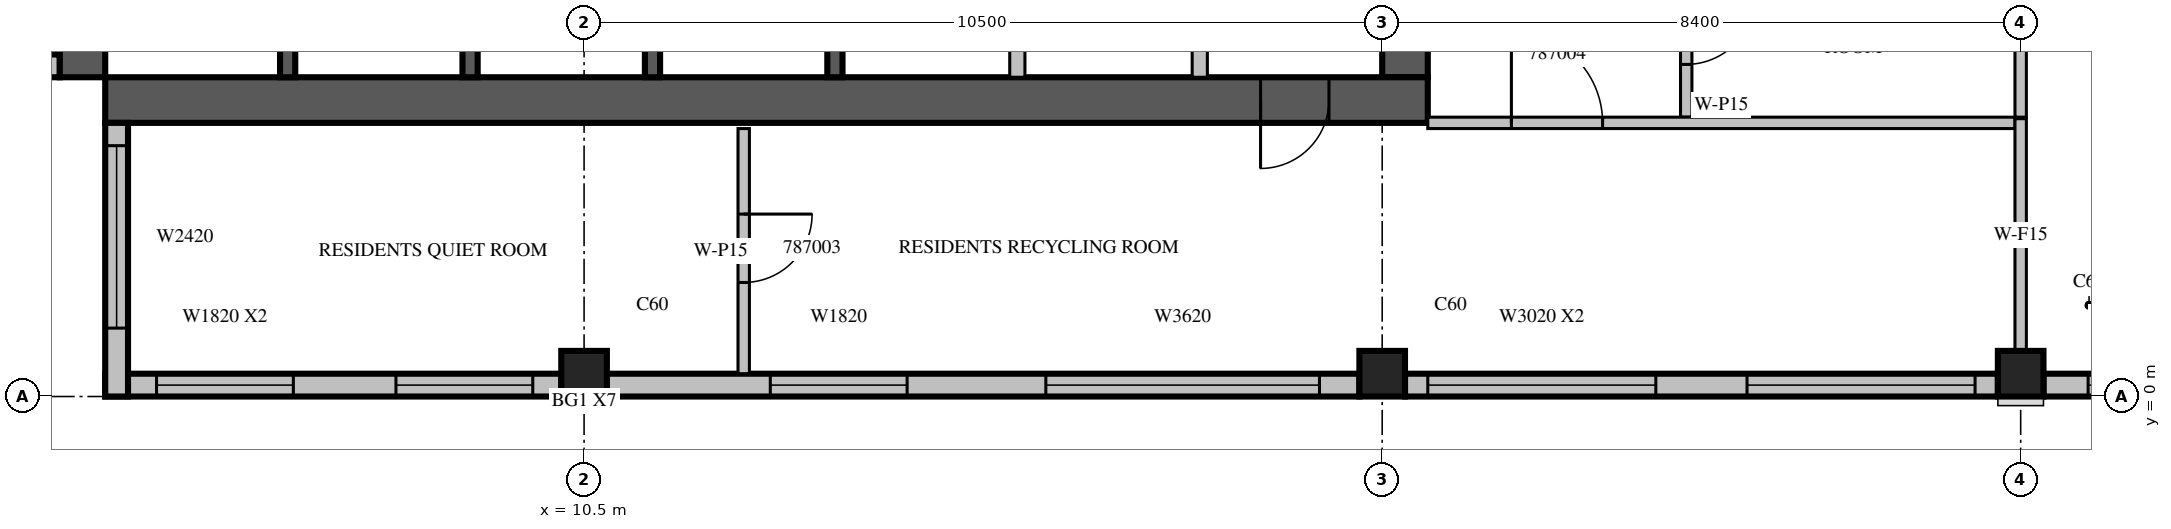
"""IFC4 building model, lengths in metres.
Left out: names, types, materials, properties, quantities, classifications, styles, units other than length and angle.
Written with IfcOpenShell. Run it as: python <this file> out.ifc"""

import sys

from ifc_helpers import new_model, si_unit, direction, frame, frame_2d, origin, origin_2d, place, context, subcontext, project, spatial, rectangle, extrude, source, transform, mapped, element, fill, save


model = new_model("IFC4")
c1 = context("Model", 3, precision=1e-05, world=origin(), true_north=direction((0.0, 1.0)))
c2 = subcontext(c1, "Body", "Model", "MODEL_VIEW")
j1 = project(units=[si_unit("LENGTHUNIT", "METRE"), si_unit("PLANEANGLEUNIT", "RADIAN")], contexts=[c1])
p1 = place(None, origin())
s1 = spatial("IfcSite", under=j1, at=p1, CompositionType="ELEMENT")
p2 = place(p1, origin())
s2 = spatial("IfcBuilding", under=s1, at=p2, CompositionType="ELEMENT")
p3 = place(p2, frame((0.0, 0.0, 365.0)))
s3 = spatial("IfcBuildingStorey", under=s2, at=p3, CompositionType="ELEMENT", Elevation=365.0)
m1 = source(origin(), c2, "Body", "SweptSolid", [
    extrude(rectangle(XDim=0.6, YDim=0.6, at=origin_2d()), origin(), (0.0, 0.0, 1.0), 3.5),
])
for number, where, z_axis, x_axis in (
    (1, (10.5, 0.3, 0.0), (0.0, 0.0, 1.0), (1.0, 0.0, 0.0)),
    (2, (21.0, 0.3, 0.0), (0.0, 0.0, 1.0), (1.0, 0.0, 0.0)),
    (3, (29.4, 0.3, 0.0), (0.0, 0.0, 1.0), (1.0, 0.0, 0.0)),
):
    element("IfcColumn", number, at=place(p3, frame(where, z_axis=z_axis, x_axis=x_axis)), inside=s3, PredefinedType="COLUMN", context=c2, shape_type="MappedRepresentation", body=[
        mapped(m1, transform((0.0, 0.0, 0.0), scale=1.0)),
    ])
m2 = source(origin(), c2, "Body", "SweptSolid", [
    extrude(rectangle(XDim=17.4, YDim=0.6, at=frame_2d((8.7, 0.0))), origin(), (0.0, 0.0, 1.0), 3.5),
])
p4 = place(p3, frame((3.9, 4.2, 0.0), z_axis=(0.0, 0.0, 1.0), x_axis=(0.0, 1.0, 0.0)))
e4 = element("IfcWall", 4, at=p4, inside=s3, PredefinedType="SHEAR", context=c2, shape_type="MappedRepresentation", body=[
    mapped(m2, transform((0.0, 0.0, 0.0), scale=1.0)),
])
m3 = source(origin(), c2, "Body", "SweptSolid", [
    extrude(rectangle(XDim=2.2, YDim=2.1, at=frame_2d((1.1, 1.05))), frame((0.0, 0.31, 0.0), z_axis=(0.0, -1.0, 0.0), x_axis=(1.0, 0.0, 0.0)), (0.0, 0.0, 1.0), 0.62),
])
p5 = place(p4, frame((4.2, 0.0, 0.0)))
e5 = element("IfcOpeningElement", 5, at=p5, cuts=e4, PredefinedType="OPENING", context=c2, shape_type="MappedRepresentation", body=[
    mapped(m3, transform((0.0, 0.0, 0.0), scale=1.0)),
])
m4 = source(origin(), c2, "Body", "SweptSolid", [
    extrude(rectangle(XDim=6.3, YDim=0.6, at=frame_2d((3.15, 0.0))), origin(), (0.0, 0.0, 1.0), 3.5),
])
p6 = place(p3, frame((21.3, 4.2, 0.0), z_axis=(0.0, 0.0, 1.0), x_axis=(0.0, 1.0, 0.0)))
e6 = element("IfcWall", 6, at=p6, inside=s3, PredefinedType="SHEAR", context=c2, shape_type="MappedRepresentation", body=[
    mapped(m4, transform((0.0, 0.0, 0.0), scale=1.0)),
])
p7 = place(p6, frame((4.0, 0.0, 0.0)))
e7 = element("IfcOpeningElement", 7, at=p7, cuts=e6, PredefinedType="OPENING", context=c2, shape_type="MappedRepresentation", body=[
    mapped(m3, transform((0.0, 0.0, 0.0), scale=1.0)),
])
p8 = place(p3, frame((4.2, 3.9, 0.0), z_axis=(0.0, 0.0, 1.0), x_axis=(1.0, 0.0, 0.0)))
e8 = element("IfcWall", 8, at=p8, inside=s3, PredefinedType="SHEAR", context=c2, shape_type="MappedRepresentation", body=[
    mapped(m2, transform((0.0, 0.0, 0.0), scale=1.0)),
])
m5 = source(origin(), c2, "Body", "SweptSolid", [
    extrude(rectangle(XDim=0.9, YDim=2.1, at=frame_2d((0.45, 1.05))), frame((0.0, 0.31, 0.0), z_axis=(0.0, -1.0, 0.0), x_axis=(1.0, 0.0, 0.0)), (0.0, 0.0, 1.0), 0.62),
])
p9 = place(p8, frame((15.2, 0.0, 0.0)))
e9 = element("IfcOpeningElement", 9, at=p9, cuts=e8, PredefinedType="OPENING", context=c2, shape_type="MappedRepresentation", body=[
    mapped(m5, transform((0.0, 0.0, 0.0), scale=1.0)),
])
p10 = place(p3, frame((4.2, 0.15, 0.0), z_axis=(0.0, 0.0, 1.0), x_axis=(1.0, 0.0, 0.0)))
e10 = element("IfcWall", 10, at=p10, inside=s3, PredefinedType="STANDARD", context=c2, shape_type="SweptSolid", body=[
    extrude(rectangle(XDim=6.0, YDim=0.3, at=frame_2d((3.0, 0.0))), origin(), (0.0, 0.0, 1.0), 3.05),
])
m6 = source(origin(), c2, "Body", "SweptSolid", [
    extrude(rectangle(XDim=1.8, YDim=2.0, at=frame_2d((0.9, 1.0))), frame((0.0, 0.16, 0.0), z_axis=(0.0, -1.0, 0.0), x_axis=(1.0, 0.0, 0.0)), (0.0, 0.0, 1.0), 0.32),
])
p11 = place(p10, frame((0.675, 0.0, 0.6)))
e11 = element("IfcOpeningElement", 11, at=p11, cuts=e10, PredefinedType="OPENING", context=c2, shape_type="MappedRepresentation", body=[
    mapped(m6, transform((0.0, 0.0, 0.0), scale=1.0)),
])
p12 = place(p10, frame((3.825, 0.0, 0.6)))
e12 = element("IfcOpeningElement", 12, at=p12, cuts=e10, PredefinedType="OPENING", context=c2, shape_type="MappedRepresentation", body=[
    mapped(m6, transform((0.0, 0.0, 0.0), scale=1.0)),
])
p13 = place(p3, frame((10.8, 0.15, 0.0), z_axis=(0.0, 0.0, 1.0), x_axis=(1.0, 0.0, 0.0)))
e13 = element("IfcWall", 13, at=p13, inside=s3, PredefinedType="STANDARD", context=c2, shape_type="SweptSolid", body=[
    extrude(rectangle(XDim=9.9, YDim=0.3, at=frame_2d((4.95, 0.0))), origin(), (0.0, 0.0, 1.0), 3.05),
])
p14 = place(p13, frame((2.15, 0.0, 0.6)))
e14 = element("IfcOpeningElement", 14, at=p14, cuts=e13, PredefinedType="OPENING", context=c2, shape_type="MappedRepresentation", body=[
    mapped(m6, transform((0.0, 0.0, 0.0), scale=1.0)),
])
m7 = source(origin(), c2, "Body", "SweptSolid", [
    extrude(rectangle(XDim=3.6, YDim=2.0, at=frame_2d((1.8, 1.0))), frame((0.0, 0.16, 0.0), z_axis=(0.0, -1.0, 0.0), x_axis=(1.0, 0.0, 0.0)), (0.0, 0.0, 1.0), 0.32),
])
p15 = place(p13, frame((5.775, 0.0, 0.6)))
e15 = element("IfcOpeningElement", 15, at=p15, cuts=e13, PredefinedType="OPENING", context=c2, shape_type="MappedRepresentation", body=[
    mapped(m7, transform((0.0, 0.0, 0.0), scale=1.0)),
])
p16 = place(p3, frame((21.3, 0.15, 0.0), z_axis=(0.0, 0.0, 1.0), x_axis=(1.0, 0.0, 0.0)))
e16 = element("IfcWall", 16, at=p16, inside=s3, PredefinedType="STANDARD", context=c2, shape_type="SweptSolid", body=[
    extrude(rectangle(XDim=7.8, YDim=0.3, at=frame_2d((3.9, 0.0))), origin(), (0.0, 0.0, 1.0), 3.05),
])
m8 = source(origin(), c2, "Body", "SweptSolid", [
    extrude(rectangle(XDim=3.0, YDim=2.0, at=frame_2d((1.5, 1.0))), frame((0.0, 0.16, 0.0), z_axis=(0.0, -1.0, 0.0), x_axis=(1.0, 0.0, 0.0)), (0.0, 0.0, 1.0), 0.32),
])
p17 = place(p16, frame((0.3, 0.0, 0.6)))
e17 = element("IfcOpeningElement", 17, at=p17, cuts=e16, PredefinedType="OPENING", context=c2, shape_type="MappedRepresentation", body=[
    mapped(m8, transform((0.0, 0.0, 0.0), scale=1.0)),
])
p18 = place(p16, frame((4.5, 0.0, 0.6)))
e18 = element("IfcOpeningElement", 18, at=p18, cuts=e16, PredefinedType="OPENING", context=c2, shape_type="MappedRepresentation", body=[
    mapped(m8, transform((0.0, 0.0, 0.0), scale=1.0)),
])
m9 = source(origin(), c2, "Body", "SweptSolid", [
    extrude(rectangle(XDim=7.8, YDim=0.3, at=frame_2d((3.9, 0.0))), origin(), (0.0, 0.0, 1.0), 3.05),
])
p19 = place(p3, frame((29.7, 0.15, 0.0), z_axis=(0.0, 0.0, 1.0), x_axis=(1.0, 0.0, 0.0)))
e19 = element("IfcWall", 19, at=p19, inside=s3, PredefinedType="STANDARD", context=c2, shape_type="MappedRepresentation", body=[
    mapped(m9, transform((0.0, 0.0, 0.0), scale=1.0)),
])
m10 = source(origin(), c2, "Body", "SweptSolid", [
    extrude(rectangle(XDim=1.2, YDim=2.0, at=frame_2d((0.6, 1.0))), frame((0.0, 0.16, 0.0), z_axis=(0.0, -1.0, 0.0), x_axis=(1.0, 0.0, 0.0)), (0.0, 0.0, 1.0), 0.32),
])
p20 = place(p19, frame((0.588, 0.0, 0.6)))
e20 = element("IfcOpeningElement", 20, at=p20, cuts=e19, PredefinedType="OPENING", context=c2, shape_type="MappedRepresentation", body=[
    mapped(m10, transform((0.0, 0.0, 0.0), scale=1.0)),
])
p21 = place(p19, frame((6.112, 0.0, 0.6)))
e21 = element("IfcOpeningElement", 21, at=p21, cuts=e19, PredefinedType="OPENING", context=c2, shape_type="MappedRepresentation", body=[
    mapped(m10, transform((0.0, 0.0, 0.0), scale=1.0)),
])
m11 = source(origin(), c2, "Body", "SweptSolid", [
    extrude(rectangle(XDim=2.4, YDim=2.0, at=frame_2d((1.2, 1.0))), frame((0.0, 0.16, 0.0), z_axis=(0.0, -1.0, 0.0), x_axis=(1.0, 0.0, 0.0)), (0.0, 0.0, 1.0), 0.32),
])
p22 = place(p19, frame((2.75, 0.0, 0.6)))
e22 = element("IfcOpeningElement", 22, at=p22, cuts=e19, PredefinedType="OPENING", context=c2, shape_type="MappedRepresentation", body=[
    mapped(m11, transform((0.0, 0.0, 0.0), scale=1.0)),
])
p23 = place(p3, frame((0.0, 4.35, 0.0), z_axis=(0.0, 0.0, 1.0), x_axis=(1.0, 0.0, 0.0)))
e23 = element("IfcWall", 23, at=p23, inside=s3, PredefinedType="STANDARD", context=c2, shape_type="SweptSolid", body=[
    extrude(rectangle(XDim=3.6, YDim=0.3, at=frame_2d((1.8, 0.0))), origin(), (0.0, 0.0, 1.0), 3.05),
])
p24 = place(p23, frame((0.9, 0.0, 0.6)))
e24 = element("IfcOpeningElement", 24, at=p24, cuts=e23, PredefinedType="OPENING", context=c2, shape_type="MappedRepresentation", body=[
    mapped(m11, transform((0.0, 0.0, 0.0), scale=1.0)),
])
m12 = source(origin(), c2, "Body", "SweptSolid", [
    extrude(rectangle(XDim=3.6, YDim=0.3, at=frame_2d((1.8, 0.0))), origin(), (0.0, 0.0, 1.0), 3.05),
])
p25 = place(p3, frame((4.35, 3.6, 0.0), z_axis=(0.0, 0.0, 1.0), x_axis=(0.0, -1.0, 0.0)))
e25 = element("IfcWall", 25, at=p25, inside=s3, PredefinedType="STANDARD", context=c2, shape_type="MappedRepresentation", body=[
    mapped(m12, transform((0.0, 0.0, 0.0), scale=1.0)),
])
p26 = place(p25, frame((0.3, 0.0, 0.6)))
e26 = element("IfcOpeningElement", 26, at=p26, cuts=e25, PredefinedType="OPENING", context=c2, shape_type="MappedRepresentation", body=[
    mapped(m11, transform((0.0, 0.0, 0.0), scale=1.0)),
])
m13 = source(origin(), c2, "Body", "SweptSolid", [
    extrude(rectangle(XDim=3.1, YDim=0.2, at=frame_2d((1.55, 0.0))), origin(), (0.0, 0.0, 1.0), 3.5),
])
for number, where, z_axis, x_axis in (
    (27, (6.6, 4.2, 0.0), (0.0, 0.0, 1.0), (0.0, 1.0, 0.0)),
    (28, (9.0, 4.2, 0.0), (0.0, 0.0, 1.0), (0.0, 1.0, 0.0)),
    (29, (11.4, 4.2, 0.0), (0.0, 0.0, 1.0), (0.0, 1.0, 0.0)),
):
    element("IfcWall", number, at=place(p3, frame(where, z_axis=z_axis, x_axis=x_axis)), inside=s3, PredefinedType="SOLIDWALL", context=c2, shape_type="MappedRepresentation", body=[
        mapped(m13, transform((0.0, 0.0, 0.0), scale=1.0)),
    ])
p27 = place(p3, frame((13.8, 4.2, 0.0), z_axis=(0.0, 0.0, 1.0), x_axis=(0.0, 1.0, 0.0)))
e30 = element("IfcWall", 30, at=p27, inside=s3, PredefinedType="SOLIDWALL", context=c2, shape_type="SweptSolid", body=[
    extrude(rectangle(XDim=3.1, YDim=0.2, at=frame_2d((1.55, 0.0))), origin(), (0.0, 0.0, 1.0), 3.05),
])
p28 = place(p3, frame((16.2, 4.2, 0.0), z_axis=(0.0, 0.0, 1.0), x_axis=(0.0, 1.0, 0.0)))
e31 = element("IfcWall", 31, at=p28, inside=s3, PredefinedType="PARTITIONING", context=c2, shape_type="SweptSolid", body=[
    extrude(rectangle(XDim=3.1, YDim=0.2, at=frame_2d((1.55, 0.0))), origin(), (0.0, 0.0, 1.0), 3.05),
])
m14 = source(origin(), c2, "Body", "SweptSolid", [
    extrude(rectangle(XDim=3.1, YDim=0.2, at=frame_2d((1.55, 0.0))), origin(), (0.0, 0.0, 1.0), 3.05),
])
p29 = place(p3, frame((18.6, 4.2, 0.0), z_axis=(0.0, 0.0, 1.0), x_axis=(0.0, 1.0, 0.0)))
e32 = element("IfcWall", 32, at=p29, inside=s3, PredefinedType="PARTITIONING", context=c2, shape_type="MappedRepresentation", body=[
    mapped(m14, transform((0.0, 0.0, 0.0), scale=1.0)),
])
p30 = place(p3, frame((25.0, 8.25, 0.0), z_axis=(0.0, 0.0, 1.0), x_axis=(0.0, -1.0, 0.0)))
e33 = element("IfcWall", 33, at=p30, inside=s3, PredefinedType="PARTITIONING", context=c2, shape_type="SweptSolid", body=[
    extrude(rectangle(XDim=4.575, YDim=0.15, at=frame_2d((2.288, 0.0))), origin(), (0.0, 0.0, 1.0), 3.05),
])
m15 = source(origin(), c2, "Body", "SweptSolid", [
    extrude(rectangle(XDim=0.9, YDim=2.1, at=frame_2d((0.45, 1.05))), frame((0.0, 0.085, 0.0), z_axis=(0.0, -1.0, 0.0), x_axis=(1.0, 0.0, 0.0)), (0.0, 0.0, 1.0), 0.17),
])
p31 = place(p30, frame((2.981, 0.0, 0.0)))
e34 = element("IfcOpeningElement", 34, at=p31, cuts=e33, PredefinedType="OPENING", context=c2, shape_type="MappedRepresentation", body=[
    mapped(m15, transform((0.0, 0.0, 0.0), scale=1.0)),
])
m16 = source(origin(), c2, "Body", "SweptSolid", [
    extrude(rectangle(XDim=4.575, YDim=0.15, at=frame_2d((2.288, 0.0))), origin(), (0.0, 0.0, 1.0), 3.05),
])
p32 = place(p3, frame((29.4, 3.675, 0.0), z_axis=(0.0, 0.0, 1.0), x_axis=(0.0, 1.0, 0.0)))
e35 = element("IfcWall", 35, at=p32, inside=s3, PredefinedType="PARTITIONING", context=c2, shape_type="MappedRepresentation", body=[
    mapped(m16, transform((0.0, 0.0, 0.0), scale=1.0)),
])
p33 = place(p3, frame((12.6, 3.525, 0.0), z_axis=(0.0, 0.0, 1.0), x_axis=(0.0, -1.0, 0.0)))
e36 = element("IfcWall", 36, at=p33, inside=s3, PredefinedType="PARTITIONING", context=c2, shape_type="SweptSolid", body=[
    extrude(rectangle(XDim=3.225, YDim=0.15, at=frame_2d((1.613, 0.0))), origin(), (0.0, 0.0, 1.0), 3.05),
])
p34 = place(p33, frame((1.125, 0.0, 0.0)))
e37 = element("IfcOpeningElement", 37, at=p34, cuts=e36, PredefinedType="OPENING", context=c2, shape_type="MappedRepresentation", body=[
    mapped(m15, transform((0.0, 0.0, 0.0), scale=1.0)),
])
p35 = place(p3, frame((21.6, 3.6, 0.0), z_axis=(0.0, 0.0, 1.0), x_axis=(1.0, 0.0, 0.0)))
e38 = element("IfcWall", 38, at=p35, inside=s3, PredefinedType="PARTITIONING", context=c2, shape_type="SweptSolid", body=[
    extrude(rectangle(XDim=7.725, YDim=0.15, at=frame_2d((3.862, 0.0))), origin(), (0.0, 0.0, 1.0), 3.05),
])
m17 = source(origin(), c2, "Body", "SweptSolid", [
    extrude(rectangle(XDim=1.2, YDim=2.1, at=frame_2d((0.6, 1.05))), frame((0.0, 0.085, 0.0), z_axis=(0.0, -1.0, 0.0), x_axis=(1.0, 0.0, 0.0)), (0.0, 0.0, 1.0), 0.17),
])
p36 = place(p35, frame((1.1, 0.0, 0.0)))
e39 = element("IfcOpeningElement", 39, at=p36, cuts=e38, PredefinedType="OPENING", context=c2, shape_type="MappedRepresentation", body=[
    mapped(m17, transform((0.0, 0.0, 0.0), scale=1.0)),
])
p37 = place(p3, frame((29.4, 0.599, 0.0), z_axis=(0.0, 0.0, 1.0), x_axis=(0.0, 1.0, 0.0)))
e40 = element("IfcWall", 40, at=p37, inside=s3, PredefinedType="PARTITIONING", context=c2, shape_type="SweptSolid", body=[
    extrude(rectangle(XDim=3.056, YDim=0.15, at=frame_2d((1.528, 0.0))), origin(), (0.0, 0.0, 1.0), 3.05),
])
m18 = source(origin(), c2, "Body", "SweptSolid", [
    extrude(rectangle(XDim=1.8, YDim=2.0, at=frame_2d((0.9, 1.0))), frame((0.0, 0.03, 0.0), z_axis=(0.0, -1.0, 0.0), x_axis=(1.0, 0.0, 0.0)), (0.0, 0.0, 1.0), 0.06),
])
p38 = place(p11, origin())
e41 = element("IfcWindow", 41, at=p38, inside=s3, PartitioningType="SINGLE_PANEL", PredefinedType="WINDOW", context=c2, shape_type="MappedRepresentation", body=[
    mapped(m18, transform((0.0, 0.0, 0.0), scale=1.0)),
])
fill(e11, e41)
p39 = place(p12, origin())
e42 = element("IfcWindow", 42, at=p39, inside=s3, PartitioningType="SINGLE_PANEL", PredefinedType="WINDOW", context=c2, shape_type="MappedRepresentation", body=[
    mapped(m18, transform((0.0, 0.0, 0.0), scale=1.0)),
])
fill(e12, e42)
p40 = place(p14, origin())
e43 = element("IfcWindow", 43, at=p40, inside=s3, PartitioningType="SINGLE_PANEL", PredefinedType="WINDOW", context=c2, shape_type="MappedRepresentation", body=[
    mapped(m18, transform((0.0, 0.0, 0.0), scale=1.0)),
])
fill(e14, e43)
m19 = source(origin(), c2, "Body", "SweptSolid", [
    extrude(rectangle(XDim=3.6, YDim=2.0, at=frame_2d((1.8, 1.0))), frame((0.0, 0.03, 0.0), z_axis=(0.0, -1.0, 0.0), x_axis=(1.0, 0.0, 0.0)), (0.0, 0.0, 1.0), 0.06),
])
p41 = place(p15, origin())
e44 = element("IfcWindow", 44, at=p41, inside=s3, PartitioningType="SINGLE_PANEL", PredefinedType="WINDOW", context=c2, shape_type="MappedRepresentation", body=[
    mapped(m19, transform((0.0, 0.0, 0.0), scale=1.0)),
])
fill(e15, e44)
m20 = source(origin(), c2, "Body", "SweptSolid", [
    extrude(rectangle(XDim=3.0, YDim=2.0, at=frame_2d((1.5, 1.0))), frame((0.0, 0.03, 0.0), z_axis=(0.0, -1.0, 0.0), x_axis=(1.0, 0.0, 0.0)), (0.0, 0.0, 1.0), 0.06),
])
p42 = place(p17, origin())
e45 = element("IfcWindow", 45, at=p42, inside=s3, PartitioningType="SINGLE_PANEL", PredefinedType="WINDOW", context=c2, shape_type="MappedRepresentation", body=[
    mapped(m20, transform((0.0, 0.0, 0.0), scale=1.0)),
])
fill(e17, e45)
p43 = place(p18, origin())
e46 = element("IfcWindow", 46, at=p43, inside=s3, PartitioningType="SINGLE_PANEL", PredefinedType="WINDOW", context=c2, shape_type="MappedRepresentation", body=[
    mapped(m20, transform((0.0, 0.0, 0.0), scale=1.0)),
])
fill(e18, e46)
m21 = source(origin(), c2, "Body", "SweptSolid", [
    extrude(rectangle(XDim=1.2, YDim=2.0, at=frame_2d((0.6, 1.0))), frame((0.0, 0.03, 0.0), z_axis=(0.0, -1.0, 0.0), x_axis=(1.0, 0.0, 0.0)), (0.0, 0.0, 1.0), 0.06),
])
p44 = place(p20, origin())
e47 = element("IfcWindow", 47, at=p44, inside=s3, PartitioningType="SINGLE_PANEL", PredefinedType="WINDOW", context=c2, shape_type="MappedRepresentation", body=[
    mapped(m21, transform((0.0, 0.0, 0.0), scale=1.0)),
])
fill(e20, e47)
m22 = source(origin(), c2, "Body", "SweptSolid", [
    extrude(rectangle(XDim=2.4, YDim=2.0, at=frame_2d((1.2, 1.0))), frame((0.0, 0.03, 0.0), z_axis=(0.0, -1.0, 0.0), x_axis=(1.0, 0.0, 0.0)), (0.0, 0.0, 1.0), 0.06),
])
p45 = place(p26, origin())
e48 = element("IfcWindow", 48, at=p45, inside=s3, PartitioningType="SINGLE_PANEL", PredefinedType="WINDOW", context=c2, shape_type="MappedRepresentation", body=[
    mapped(m22, transform((0.0, 0.0, 0.0), scale=1.0)),
])
fill(e26, e48)
m23 = source(origin(), c2, "Body", "SweptSolid", [
    extrude(rectangle(XDim=0.9, YDim=2.1, at=frame_2d((0.45, 1.05))), frame((0.0, 0.025, 0.0), z_axis=(0.0, -1.0, 0.0), x_axis=(1.0, 0.0, 0.0)), (0.0, 0.0, 1.0), 0.05),
])
p46 = place(p9, origin())
e49 = element("IfcDoor", 49, at=p46, inside=s3, OperationType="SINGLE_SWING_RIGHT", PredefinedType="DOOR", context=c2, shape_type="MappedRepresentation", body=[
    mapped(m23, transform((0.0, 0.0, 0.0), scale=1.0)),
])
fill(e9, e49)
p47 = place(p31, origin())
e50 = element("IfcDoor", 50, at=p47, inside=s3, OperationType="SINGLE_SWING_LEFT", PredefinedType="DOOR", context=c2, shape_type="MappedRepresentation", body=[
    mapped(m23, transform((0.0, 0.0, 0.0), scale=1.0)),
])
fill(e34, e50)
p48 = place(p34, origin())
e51 = element("IfcDoor", 51, at=p48, inside=s3, OperationType="SINGLE_SWING_LEFT", PredefinedType="DOOR", context=c2, shape_type="MappedRepresentation", body=[
    mapped(m23, transform((0.0, 0.0, 0.0), scale=1.0)),
])
fill(e37, e51)
m24 = source(origin(), c2, "Body", "SweptSolid", [
    extrude(rectangle(XDim=1.2, YDim=2.1, at=frame_2d((0.6, 1.05))), frame((0.0, 0.025, 0.0), z_axis=(0.0, -1.0, 0.0), x_axis=(1.0, 0.0, 0.0)), (0.0, 0.0, 1.0), 0.05),
])
p49 = place(p36, origin())
e52 = element("IfcDoor", 52, at=p49, inside=s3, OperationType="SINGLE_SWING_LEFT", PredefinedType="DOOR", context=c2, shape_type="MappedRepresentation", body=[
    mapped(m24, transform((0.0, 0.0, 0.0), scale=1.0)),
])
fill(e39, e52)
save(model, sys.argv[1])
